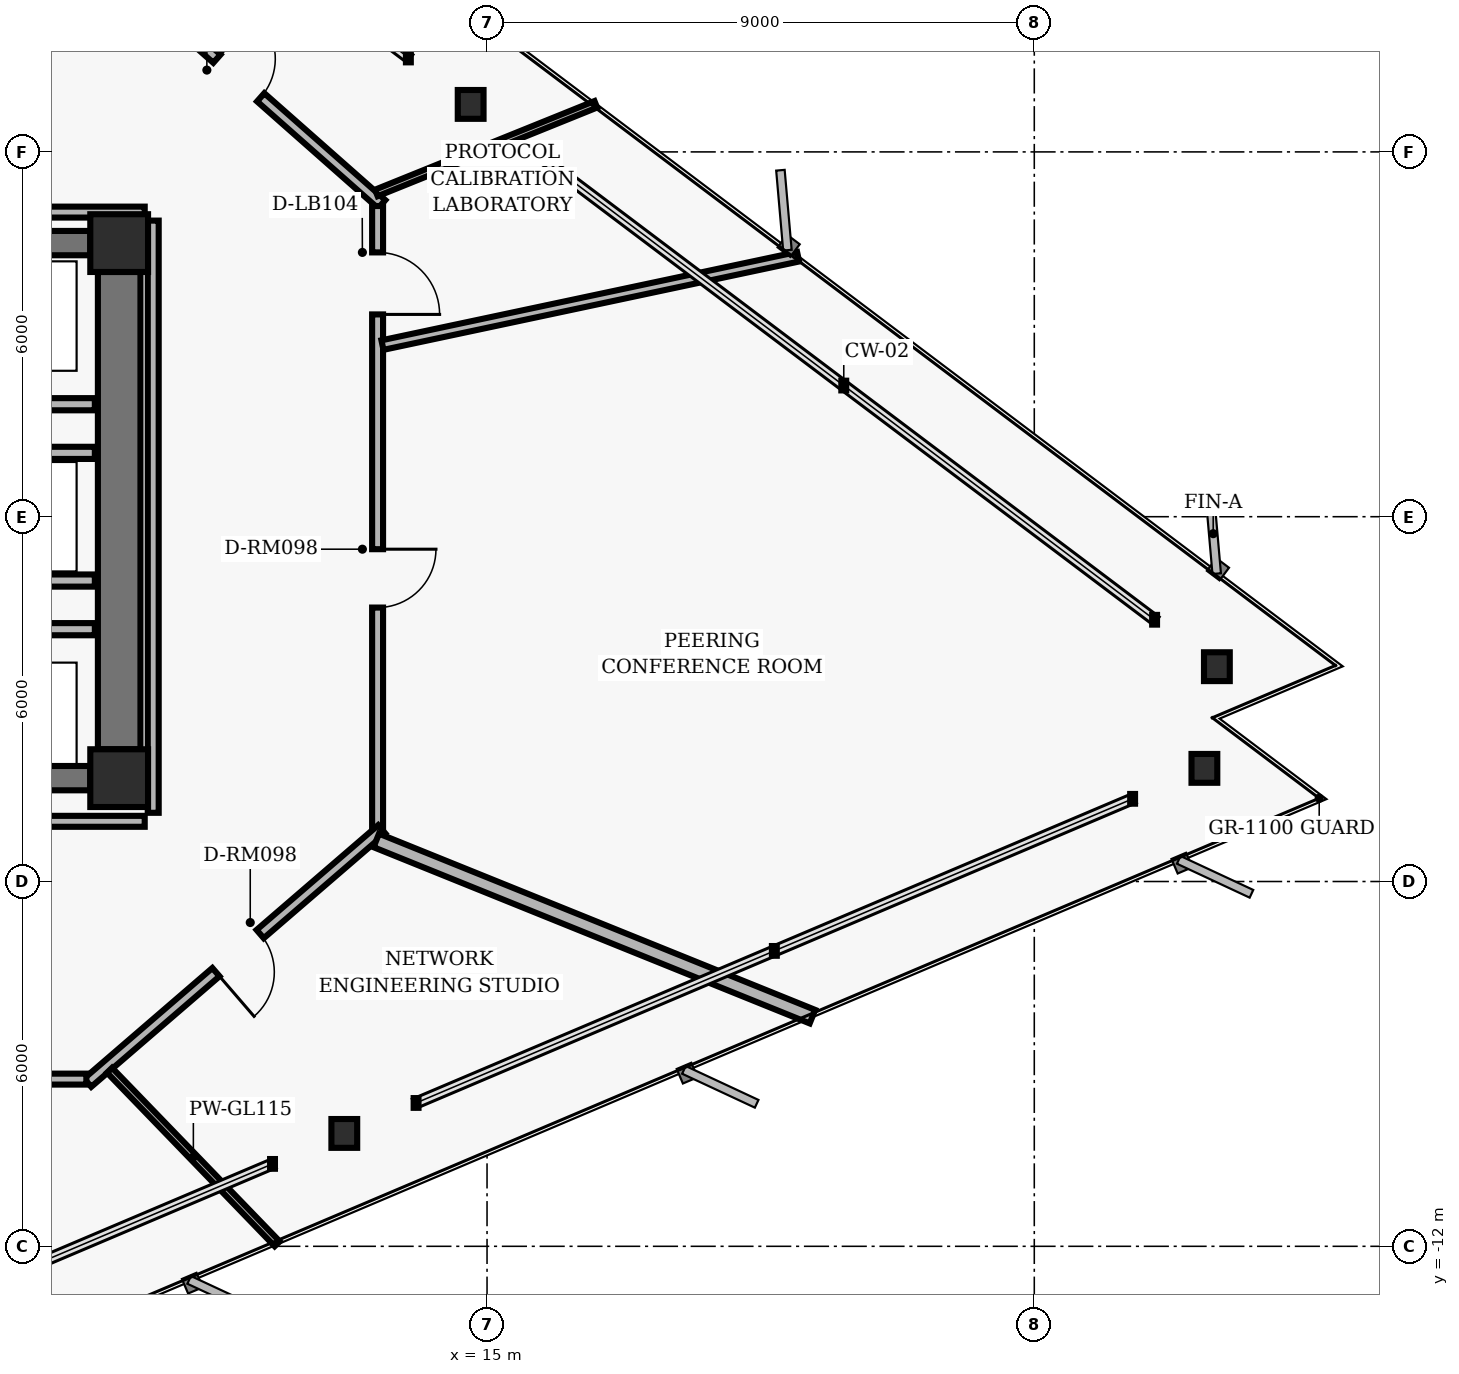
"""IFC4 building model, lengths in metres.
Left out: names, types, materials, properties, quantities, classifications, styles, units other than length and angle.
Written with IfcOpenShell. Run it as: python <this file> out.ifc"""

import sys

from ifc_helpers import new_model, si_unit, direction, frame, frame_2d, origin, origin_2d, place, context, subcontext, project, spatial, rectangle, hollow_rectangle, i_section, extrude, element, fill, save


model = new_model("IFC4")
c1 = context("Model", 3, precision=1e-05, world=origin(), true_north=direction((0.0, 1.0)))
c2 = subcontext(c1, "Body", "Model", "MODEL_VIEW")
j1 = project(units=[si_unit("LENGTHUNIT", "METRE"), si_unit("PLANEANGLEUNIT", "RADIAN")], contexts=[c1])
p1 = place(None, origin())
s1 = spatial("IfcSite", under=j1, at=p1, CompositionType="ELEMENT")
p2 = place(p1, origin())
s2 = spatial("IfcBuilding", under=s1, at=p2, CompositionType="ELEMENT")
p3 = place(p2, frame((0.0, 0.0, 49.6)))
s3 = spatial("IfcBuildingStorey", under=s2, at=p3, CompositionType="ELEMENT", Elevation=49.6)
for number, where, z_axis, x_axis in (
    (1, (8.95, 4.5, 0.0), (0.0, 0.0, 1.0), (1.0, 0.0, 0.0)),
    (2, (8.95, -4.3, 0.0), (0.0, 0.0, 1.0), (1.0, 0.0, 0.0)),
):
    element("IfcColumn", number, at=place(p3, frame(where, z_axis=z_axis, x_axis=x_axis)), inside=s3, PredefinedType="COLUMN", context=c2, shape_type="SweptSolid", body=[
        extrude(hollow_rectangle(XDim=0.95, YDim=0.95, WallThickness=0.06, InnerFilletRadius=0.02, OuterFilletRadius=0.04, at=origin_2d()), origin(), (0.0, 0.0, 1.0), 3.36),
    ])
p4 = place(p3, frame((8.95, -3.825, 0.0), z_axis=(0.0, 0.0, 1.0), x_axis=(0.0, 1.0, 0.0)))
e3 = element("IfcWall", 3, at=p4, inside=s3, PredefinedType="SHEAR", context=c2, shape_type="SweptSolid", body=[
    extrude(rectangle(XDim=7.85, YDim=0.7, at=frame_2d((3.925, 0.0))), origin(), (0.0, 0.0, 1.0), 3.098),
])
for number, where, z_axis, x_axis in (
    (4, (6.525, 4.5, 0.0), (0.0, 0.0, 1.0), (1.0, 0.0, 0.0)),
    (5, (6.525, -4.3, 0.0), (0.0, 0.0, 1.0), (1.0, 0.0, 0.0)),
):
    element("IfcWall", number, at=place(p3, frame(where, z_axis=z_axis, x_axis=x_axis)), inside=s3, PredefinedType="SHEAR", context=c2, shape_type="SweptSolid", body=[
        extrude(rectangle(XDim=1.95, YDim=0.4, at=frame_2d((0.975, 0.0))), origin(), (0.0, 0.0, 1.0), 3.098),
    ])
for number, where, z_axis, x_axis in (
    (6, (27.003, -2.467, 0.0), (0.0, 0.0, 1.0), (1.0, 0.0, 0.0)),
    (7, (14.73, 6.781, 0.0), (0.0, 0.0, 1.0), (1.0, 0.0, 0.0)),
    (8, (12.653, -10.143, 0.0), (0.0, 0.0, 1.0), (1.0, 0.0, 0.0)),
    (9, (26.798, -4.139, 0.0), (0.0, 0.0, 1.0), (1.0, 0.0, 0.0)),
):
    element("IfcColumn", number, at=place(p3, frame(where, z_axis=z_axis, x_axis=x_axis)), inside=s3, PredefinedType="COLUMN", context=c2, shape_type="SweptSolid", body=[
        extrude(i_section(OverallWidth=0.424, OverallDepth=0.474, WebThickness=0.048, FlangeThickness=0.077, FilletRadius=0.025, at=origin_2d()), origin(), (0.0, 0.0, 1.0), 3.36),
    ])
for number, where, z_axis, x_axis in (
    (10, (6.45, -1.85, 0.0), (0.0, 0.0, 1.0), (1.0, 0.0, 0.0)),
    (11, (6.45, 1.85, 0.0), (0.0, 0.0, 1.0), (1.0, 0.0, 0.0)),
):
    element("IfcWall", number, at=place(p3, frame(where, z_axis=z_axis, x_axis=x_axis)), inside=s3, PredefinedType="PARTITIONING", context=c2, shape_type="SweptSolid", body=[
        extrude(rectangle(XDim=2.1, YDim=0.2, at=frame_2d((1.05, 0.0))), origin(), (0.0, 0.0, 1.0), 3.073),
    ])
for number, where, z_axis, x_axis in (
    (12, (6.64, -1.05, 0.0), (0.0, 0.0, 1.0), (1.0, 0.0, 0.0)),
    (13, (6.64, 1.05, 0.0), (0.0, 0.0, 1.0), (1.0, 0.0, 0.0)),
):
    element("IfcWall", number, at=place(p3, frame(where, z_axis=z_axis, x_axis=x_axis)), inside=s3, PredefinedType="PARTITIONING", context=c2, shape_type="SweptSolid", body=[
        extrude(rectangle(XDim=1.91, YDim=0.2, at=frame_2d((0.955, 0.0))), origin(), (0.0, 0.0, 1.0), 3.073),
    ])
p5 = place(p3, frame((8.567, 9.29, 0.0), z_axis=(0.0, 0.0, 1.0), x_axis=(0.749626463267, -0.66186113768, 0.0)))
e14 = element("IfcWall", 14, at=p5, inside=s3, PredefinedType="PARTITIONING", context=c2, shape_type="SweptSolid", body=[
    extrude(rectangle(XDim=6.27, YDim=0.18, at=frame_2d((3.135, 0.0))), origin(), (0.0, 0.0, 1.0), 2.587),
])
p6 = place(p5, frame((2.655, 0.0, 0.0)))
e15 = element("IfcOpeningElement", 15, at=p6, cuts=e14, PredefinedType="OPENING", context=c2, shape_type="SweptSolid", body=[
    extrude(rectangle(XDim=0.96, YDim=2.02, at=frame_2d((0.48, 1.01))), frame((0.0, 0.1, 0.0), z_axis=(0.0, -1.0, 0.0), x_axis=(1.0, 0.0, 0.0)), (0.0, 0.0, 1.0), 0.2),
])
p7 = place(p3, frame((13.2, 5.11, 0.0), z_axis=(0.0, 0.0, 1.0), x_axis=(0.0, -1.0, 0.0)))
e16 = element("IfcWall", 16, at=p7, inside=s3, PredefinedType="PARTITIONING", context=c2, shape_type="SweptSolid", body=[
    extrude(rectangle(XDim=10.22, YDim=0.18, at=frame_2d((5.11, 0.0))), origin(), (0.0, 0.0, 1.0), 3.073),
])
p8 = place(p7, frame((5.644, 0.0, 0.0)))
e17 = element("IfcOpeningElement", 17, at=p8, cuts=e16, PredefinedType="OPENING", context=c2, shape_type="SweptSolid", body=[
    extrude(rectangle(XDim=0.96, YDim=2.02, at=frame_2d((0.48, 1.01))), frame((0.0, 0.1, 0.0), z_axis=(0.0, -1.0, 0.0), x_axis=(1.0, 0.0, 0.0)), (0.0, 0.0, 1.0), 0.2),
])
p9 = place(p7, frame((0.763, 0.0, 0.0)))
e18 = element("IfcOpeningElement", 18, at=p9, cuts=e16, PredefinedType="OPENING", context=c2, shape_type="SweptSolid", body=[
    extrude(rectangle(XDim=1.02, YDim=2.02, at=frame_2d((0.51, 1.01))), frame((0.0, 0.1, 0.0), z_axis=(0.0, -1.0, 0.0), x_axis=(1.0, 0.0, 0.0)), (0.0, 0.0, 1.0), 0.2),
])
p10 = place(p3, frame((13.268, -5.141, 0.0), z_axis=(0.0, 0.0, 1.0), x_axis=(-0.757534501725, -0.65279512766, 0.0)))
e19 = element("IfcWall", 19, at=p10, inside=s3, PredefinedType="PARTITIONING", context=c2, shape_type="SweptSolid", body=[
    extrude(rectangle(XDim=6.385, YDim=0.18, at=frame_2d((3.192, 0.0))), origin(), (0.0, 0.0, 1.0), 3.073),
])
p11 = place(p10, frame((2.639, 0.0, 0.0)))
e20 = element("IfcOpeningElement", 20, at=p11, cuts=e19, PredefinedType="OPENING", context=c2, shape_type="SweptSolid", body=[
    extrude(rectangle(XDim=0.96, YDim=2.02, at=frame_2d((0.48, 1.01))), frame((0.0, 0.1, 0.0), z_axis=(0.0, -1.0, 0.0), x_axis=(1.0, 0.0, 0.0)), (0.0, 0.0, 1.0), 0.2),
])
p12 = place(p3, frame((8.41, -9.25, 0.0), z_axis=(0.0, 0.0, 1.0), x_axis=(-1.0, 0.0, 0.0)))
e21 = element("IfcWall", 21, at=p12, inside=s3, PredefinedType="PARTITIONING", context=c2, shape_type="SweptSolid", body=[
    extrude(rectangle(XDim=17.0, YDim=0.18, at=frame_2d((8.5, 0.0))), origin(), (0.0, 0.0, 1.0), 2.587),
])
p13 = place(p12, frame((5.34, 0.0, 0.0)))
e22 = element("IfcOpeningElement", 22, at=p13, cuts=e21, PredefinedType="OPENING", context=c2, shape_type="SweptSolid", body=[
    extrude(rectangle(XDim=1.02, YDim=2.02, at=frame_2d((0.51, 1.01))), frame((0.0, 0.1, 0.0), z_axis=(0.0, -1.0, 0.0), x_axis=(1.0, 0.0, 0.0)), (0.0, 0.0, 1.0), 0.2),
])
p14 = place(p3, frame((6.03, -5.01, 0.0), z_axis=(0.0, 0.0, 1.0), x_axis=(1.0, 0.0, 0.0)))
e23 = element("IfcWall", 23, at=p14, inside=s3, PredefinedType="PARTITIONING", context=c2, shape_type="SweptSolid", body=[
    extrude(rectangle(XDim=3.34, YDim=0.18, at=frame_2d((1.67, 0.0))), origin(), (0.0, 0.0, 1.0), 3.073),
])
p15 = place(p3, frame((9.51, -4.87, 0.0), z_axis=(0.0, 0.0, 1.0), x_axis=(0.0, 1.0, 0.0)))
e24 = element("IfcWall", 24, at=p15, inside=s3, PredefinedType="PARTITIONING", context=c2, shape_type="SweptSolid", body=[
    extrude(rectangle(XDim=9.74, YDim=0.18, at=frame_2d((4.87, 0.0))), origin(), (0.0, 0.0, 1.0), 3.073),
])
p16 = place(p3, frame((9.37, 5.01, 0.0), z_axis=(0.0, 0.0, 1.0), x_axis=(-1.0, 0.0, 0.0)))
e25 = element("IfcWall", 25, at=p16, inside=s3, PredefinedType="PARTITIONING", context=c2, shape_type="SweptSolid", body=[
    extrude(rectangle(XDim=2.808, YDim=0.18, at=frame_2d((1.404, 0.0))), origin(), (0.0, 0.0, 1.0), 3.073),
])
p17 = place(p3, frame((8.792, -9.104, 0.0), z_axis=(0.0, 0.0, 1.0), x_axis=(0.694664773763, -0.719333616685, 0.0)))
e26 = element("IfcWall", 26, at=p17, inside=s3, PredefinedType="MOVABLE", context=c2, shape_type="SweptSolid", body=[
    extrude(rectangle(XDim=3.969, YDim=0.115, at=frame_2d((1.984, 0.0))), origin(), (0.0, 0.0, 1.0), 3.073),
])
p18 = place(p3, frame((13.178, -5.324, 0.0), z_axis=(0.0, 0.0, 1.0), x_axis=(0.927191467136, -0.374587751094, 0.0)))
e27 = element("IfcWall", 27, at=p18, inside=s3, PredefinedType="PARTITIONING", context=c2, shape_type="SweptSolid", body=[
    extrude(rectangle(XDim=7.736, YDim=0.24, at=frame_2d((3.868, 0.0))), origin(), (0.0, 0.0, 1.0), 3.073),
])
p19 = place(p3, frame((13.28, 2.823, 0.0), z_axis=(0.0, 0.0, 1.0), x_axis=(0.978150237712, 0.207899284425, 0.0)))
e28 = element("IfcWall", 28, at=p19, inside=s3, PredefinedType="PARTITIONING", context=c2, shape_type="SweptSolid", body=[
    extrude(rectangle(XDim=6.988, YDim=0.16, at=frame_2d((3.494, 0.0))), origin(), (0.0, 0.0, 1.0), 3.073),
])
p20 = place(p3, frame((13.179, 5.325, 0.0), z_axis=(0.0, 0.0, 1.0), x_axis=(0.927199532139, 0.374567787725, 0.0)))
e29 = element("IfcWall", 29, at=p20, inside=s3, PredefinedType="MOVABLE", context=c2, shape_type="SweptSolid", body=[
    extrude(rectangle(XDim=3.893, YDim=0.115, at=frame_2d((1.946, 0.0))), origin(), (0.0, 0.0, 1.0), 3.073),
])
p21 = place(p11, origin())
e30 = element("IfcDoor", 30, at=p21, inside=s3, OperationType="SINGLE_SWING_RIGHT", PredefinedType="DOOR", context=c2, shape_type="SweptSolid", body=[
    extrude(rectangle(XDim=0.96, YDim=2.02, at=frame_2d((0.48, 1.01))), frame((0.0, 0.025, 0.0), z_axis=(0.0, -1.0, 0.0), x_axis=(1.0, 0.0, 0.0)), (0.0, 0.0, 1.0), 0.05),
])
fill(e20, e30)
p22 = place(p8, origin())
e31 = element("IfcDoor", 31, at=p22, inside=s3, OperationType="SINGLE_SWING_LEFT", PredefinedType="DOOR", context=c2, shape_type="SweptSolid", body=[
    extrude(rectangle(XDim=0.96, YDim=2.02, at=frame_2d((0.48, 1.01))), frame((0.0, 0.025, 0.0), z_axis=(0.0, -1.0, 0.0), x_axis=(1.0, 0.0, 0.0)), (0.0, 0.0, 1.0), 0.05),
])
fill(e17, e31)
p23 = place(p9, origin())
e32 = element("IfcDoor", 32, at=p23, inside=s3, OperationType="SINGLE_SWING_RIGHT", PredefinedType="DOOR", context=c2, shape_type="SweptSolid", body=[
    extrude(rectangle(XDim=1.02, YDim=2.02, at=frame_2d((0.51, 1.01))), frame((0.0, 0.025, 0.0), z_axis=(0.0, -1.0, 0.0), x_axis=(1.0, 0.0, 0.0)), (0.0, 0.0, 1.0), 0.05),
])
fill(e18, e32)
p24 = place(p6, origin())
e33 = element("IfcDoor", 33, at=p24, inside=s3, OperationType="SINGLE_SWING_LEFT", PredefinedType="DOOR", context=c2, shape_type="SweptSolid", body=[
    extrude(rectangle(XDim=0.96, YDim=2.02, at=frame_2d((0.48, 1.01))), frame((0.0, 0.025, 0.0), z_axis=(0.0, -1.0, 0.0), x_axis=(1.0, 0.0, 0.0)), (0.0, 0.0, 1.0), 0.05),
])
fill(e15, e33)
save(model, sys.argv[1])
